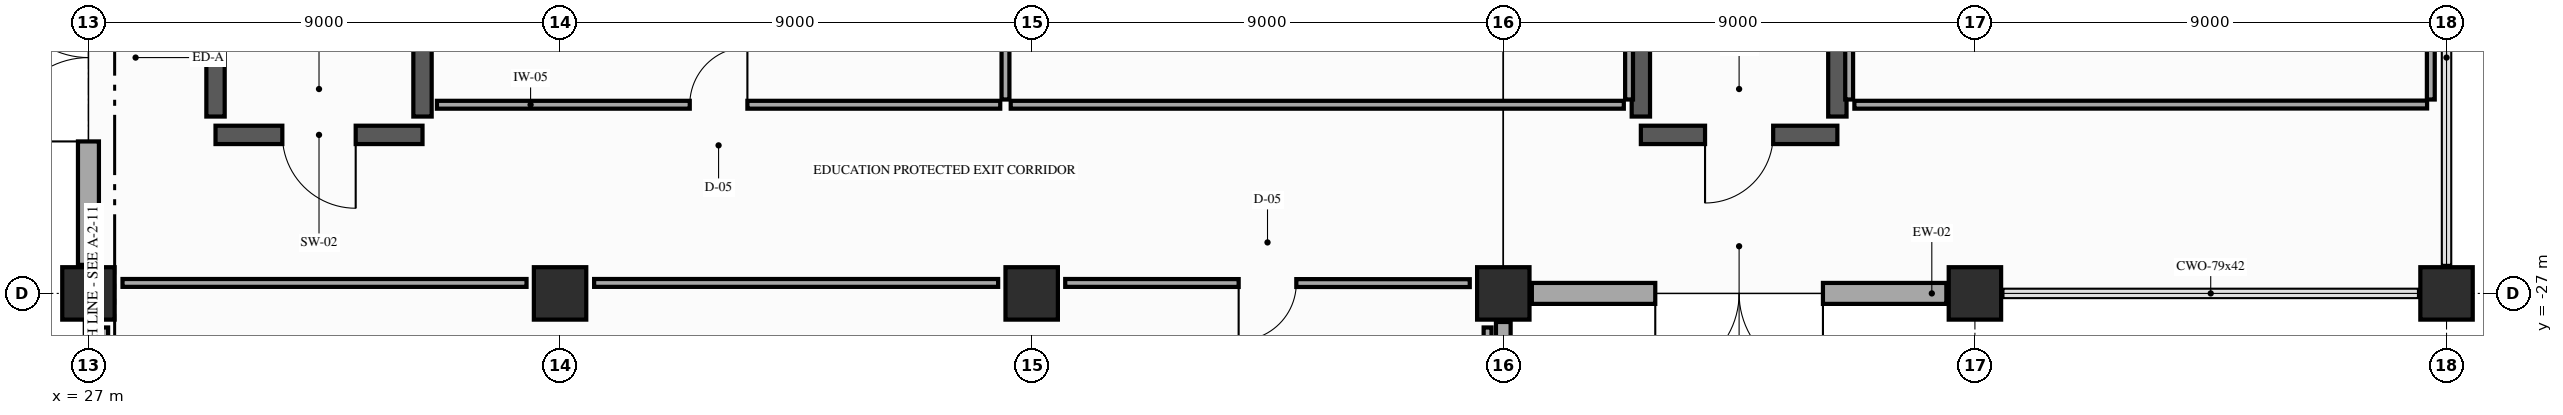
"""IFC4 building model, lengths in metres.
Left out: names, types, materials, properties, quantities, classifications, styles, units other than length and angle.
Written with IfcOpenShell. Run it as: python <this file> out.ifc"""

import sys

from ifc_helpers import new_model, si_unit, direction, frame, frame_2d, origin, origin_2d, place, context, subcontext, project, spatial, rectangle, extrude, element, fill, save


model = new_model("IFC4")
c1 = context("Model", 3, precision=1e-05, world=origin(), true_north=direction((0.0, 1.0)))
c2 = subcontext(c1, "Body", "Model", "MODEL_VIEW")
j1 = project(units=[si_unit("LENGTHUNIT", "METRE"), si_unit("PLANEANGLEUNIT", "RADIAN")], contexts=[c1])
p1 = place(None, origin())
s1 = spatial("IfcSite", under=j1, at=p1, CompositionType="ELEMENT")
p2 = place(p1, origin())
s2 = spatial("IfcBuilding", under=s1, at=p2, CompositionType="ELEMENT")
p3 = place(p2, origin())
s3 = spatial("IfcBuildingStorey", under=s2, at=p3, CompositionType="ELEMENT", Elevation=0.0)
for number, where, z_axis, x_axis in (
    (1, (27.0, -27.0, 0.0), (0.0, 0.0, 1.0), (1.0, 0.0, 0.0)),
    (2, (36.0, -27.0, 0.0), (0.0, 0.0, 1.0), (1.0, 0.0, 0.0)),
    (3, (45.0, -27.0, 0.0), (0.0, 0.0, 1.0), (1.0, 0.0, 0.0)),
    (4, (54.0, -27.0, 0.0), (0.0, 0.0, 1.0), (1.0, 0.0, 0.0)),
    (5, (63.0, -27.0, 0.0), (0.0, 0.0, 1.0), (1.0, 0.0, 0.0)),
    (6, (72.0, -27.0, 0.0), (0.0, 0.0, 1.0), (1.0, 0.0, 0.0)),
):
    element("IfcColumn", number, at=place(p3, frame(where, z_axis=z_axis, x_axis=x_axis)), inside=s3, PredefinedType="COLUMN", context=c2, shape_type="SweptSolid", body=[
        extrude(rectangle(XDim=1.0, YDim=1.0, at=origin_2d()), origin(), (0.0, 0.0, 1.0), 5.4),
    ])
p4 = place(p3, frame((62.455, -27.0, 0.0), z_axis=(0.0, 0.0, 1.0), x_axis=(-1.0, 0.0, 0.0)))
e7 = element("IfcWall", 7, at=p4, inside=s3, PredefinedType="SOLIDWALL", context=c2, shape_type="SweptSolid", body=[
    extrude(rectangle(XDim=7.91, YDim=0.4, at=frame_2d((3.955, 0.0))), origin(), (0.0, 0.0, 1.0), 4.205),
])
p5 = place(p4, frame((2.355, 0.0, 0.0)))
e8 = element("IfcOpeningElement", 8, at=p5, cuts=e7, PredefinedType="OPENING", context=c2, shape_type="SweptSolid", body=[
    extrude(rectangle(XDim=3.2, YDim=2.8, at=frame_2d((1.6, 1.4))), frame((0.0, 0.21, 0.0), z_axis=(0.0, -1.0, 0.0), x_axis=(1.0, 0.0, 0.0)), (0.0, 0.0, 1.0), 0.42),
])
p6 = place(p3, frame((54.0, -27.545, 0.0), z_axis=(0.0, 0.0, 1.0), x_axis=(0.0, -1.0, 0.0)))
e9 = element("IfcWall", 9, at=p6, inside=s3, PredefinedType="SOLIDWALL", context=c2, shape_type="SweptSolid", body=[
    extrude(rectangle(XDim=7.91, YDim=0.28, at=frame_2d((3.955, 0.0))), origin(), (0.0, 0.0, 1.0), 4.205),
])
p7 = place(p6, frame((3.205, 0.0, 0.9)))
e10 = element("IfcOpeningElement", 10, at=p7, cuts=e9, PredefinedType="OPENING", context=c2, shape_type="SweptSolid", body=[
    extrude(rectangle(XDim=1.5, YDim=2.4, at=frame_2d((0.75, 1.2))), frame((0.0, 0.15, 0.0), z_axis=(0.0, -1.0, 0.0), x_axis=(1.0, 0.0, 0.0)), (0.0, 0.0, 1.0), 0.3),
])
p8 = place(p3, frame((27.0, -26.455, 0.0), z_axis=(0.0, 0.0, 1.0), x_axis=(0.0, 1.0, 0.0)))
e11 = element("IfcWall", 11, at=p8, inside=s3, PredefinedType="SOLIDWALL", context=c2, shape_type="SweptSolid", body=[
    extrude(rectangle(XDim=7.91, YDim=0.4, at=frame_2d((3.955, 0.0))), origin(), (0.0, 0.0, 1.0), 4.205),
])
p9 = place(p8, frame((2.355, 0.0, 0.0)))
e12 = element("IfcOpeningElement", 12, at=p9, cuts=e11, PredefinedType="OPENING", context=c2, shape_type="SweptSolid", body=[
    extrude(rectangle(XDim=3.2, YDim=3.0, at=frame_2d((1.6, 1.5))), frame((0.0, 0.21, 0.0), z_axis=(0.0, -1.0, 0.0), x_axis=(1.0, 0.0, 0.0)), (0.0, 0.0, 1.0), 0.42),
])
p10 = place(p3, frame((33.375, -23.975, 0.0), z_axis=(0.0, 0.0, 1.0), x_axis=(-1.0, 0.0, 0.0)))
e13 = element("IfcWall", 13, at=p10, inside=s3, PredefinedType="SHEAR", context=c2, shape_type="SweptSolid", body=[
    extrude(rectangle(XDim=3.95, YDim=0.35, at=frame_2d((1.975, 0.0))), origin(), (0.0, 0.0, 1.0), 5.12),
])
p11 = place(p10, frame((1.275, 0.0, 0.0)))
e14 = element("IfcOpeningElement", 14, at=p11, cuts=e13, PredefinedType="OPENING", context=c2, shape_type="SweptSolid", body=[
    extrude(rectangle(XDim=1.4, YDim=2.2, at=frame_2d((0.7, 1.1))), frame((0.0, 0.185, 0.0), z_axis=(0.0, -1.0, 0.0), x_axis=(1.0, 0.0, 0.0)), (0.0, 0.0, 1.0), 0.37),
])
for number, where, z_axis, x_axis in (
    (15, (29.425, -23.625, 0.0), (0.0, 0.0, 1.0), (0.0, 1.0, 0.0)),
    (16, (33.375, -23.625, 0.0), (0.0, 0.0, 1.0), (0.0, 1.0, 0.0)),
):
    element("IfcWall", number, at=place(p3, frame(where, z_axis=z_axis, x_axis=x_axis)), inside=s3, PredefinedType="SHEAR", context=c2, shape_type="SweptSolid", body=[
        extrude(rectangle(XDim=9.1, YDim=0.35, at=frame_2d((4.55, 0.0))), origin(), (0.0, 0.0, 1.0), 5.12),
    ])
p12 = place(p3, frame((60.375, -23.975, 0.0), z_axis=(0.0, 0.0, 1.0), x_axis=(-1.0, 0.0, 0.0)))
e17 = element("IfcWall", 17, at=p12, inside=s3, PredefinedType="SHEAR", context=c2, shape_type="SweptSolid", body=[
    extrude(rectangle(XDim=3.75, YDim=0.35, at=frame_2d((1.875, 0.0))), origin(), (0.0, 0.0, 1.0), 5.12),
])
p13 = place(p12, frame((1.225, 0.0, 0.0)))
e18 = element("IfcOpeningElement", 18, at=p13, cuts=e17, PredefinedType="OPENING", context=c2, shape_type="SweptSolid", body=[
    extrude(rectangle(XDim=1.3, YDim=2.2, at=frame_2d((0.65, 1.1))), frame((0.0, 0.185, 0.0), z_axis=(0.0, -1.0, 0.0), x_axis=(1.0, 0.0, 0.0)), (0.0, 0.0, 1.0), 0.37),
])
for number, where, z_axis, x_axis in (
    (19, (56.625, -23.625, 0.0), (0.0, 0.0, 1.0), (0.0, 1.0, 0.0)),
    (20, (60.375, -23.625, 0.0), (0.0, 0.0, 1.0), (0.0, 1.0, 0.0)),
):
    element("IfcWall", number, at=place(p3, frame(where, z_axis=z_axis, x_axis=x_axis)), inside=s3, PredefinedType="SHEAR", context=c2, shape_type="SweptSolid", body=[
        extrude(rectangle(XDim=9.1, YDim=0.35, at=frame_2d((4.55, 0.0))), origin(), (0.0, 0.0, 1.0), 5.12),
    ])
p14 = place(p3, frame((33.65, -23.4, 0.0), z_axis=(0.0, 0.0, 1.0), x_axis=(1.0, 0.0, 0.0)))
e21 = element("IfcWall", 21, at=p14, inside=s3, PredefinedType="PARTITIONING", context=c2, shape_type="SweptSolid", body=[
    extrude(rectangle(XDim=10.75, YDim=0.15, at=frame_2d((5.375, 0.0))), origin(), (0.0, 0.0, 1.0), 4.255),
])
p15 = place(p14, frame((4.825, 0.0, 0.0)))
e22 = element("IfcOpeningElement", 22, at=p15, cuts=e21, PredefinedType="OPENING", context=c2, shape_type="SweptSolid", body=[
    extrude(rectangle(XDim=1.1, YDim=2.15, at=frame_2d((0.55, 1.075))), frame((0.0, 0.085, 0.0), z_axis=(0.0, -1.0, 0.0), x_axis=(1.0, 0.0, 0.0)), (0.0, 0.0, 1.0), 0.17),
])
p16 = place(p3, frame((44.5, -23.3, 0.0), z_axis=(0.0, 0.0, 1.0), x_axis=(0.0, 1.0, 0.0)))
e23 = element("IfcWall", 23, at=p16, inside=s3, PredefinedType="PARTITIONING", context=c2, shape_type="SweptSolid", body=[
    extrude(rectangle(XDim=4.66, YDim=0.15, at=frame_2d((2.33, 0.0))), origin(), (0.0, 0.0, 1.0), 4.255),
])
p17 = place(p3, frame((44.6, -23.4, 0.0), z_axis=(0.0, 0.0, 1.0), x_axis=(1.0, 0.0, 0.0)))
e24 = element("IfcWall", 24, at=p17, inside=s3, PredefinedType="PARTITIONING", context=c2, shape_type="SweptSolid", body=[
    extrude(rectangle(XDim=11.7, YDim=0.15, at=frame_2d((5.85, 0.0))), origin(), (0.0, 0.0, 1.0), 4.255),
])
p18 = place(p3, frame((56.4, -23.3, 0.0), z_axis=(0.0, 0.0, 1.0), x_axis=(0.0, 1.0, 0.0)))
e25 = element("IfcWall", 25, at=p18, inside=s3, PredefinedType="PARTITIONING", context=c2, shape_type="SweptSolid", body=[
    extrude(rectangle(XDim=13.9, YDim=0.15, at=frame_2d((6.95, 0.0))), origin(), (0.0, 0.0, 1.0), 4.205),
])
p19 = place(p18, frame((9.736, 0.0, 0.0)))
e26 = element("IfcOpeningElement", 26, at=p19, cuts=e25, PredefinedType="OPENING", context=c2, shape_type="SweptSolid", body=[
    extrude(rectangle(XDim=1.1, YDim=2.15, at=frame_2d((0.55, 1.075))), frame((0.0, 0.085, 0.0), z_axis=(0.0, -1.0, 0.0), x_axis=(1.0, 0.0, 0.0)), (0.0, 0.0, 1.0), 0.17),
])
p20 = place(p3, frame((27.3, -27.65, 0.0), z_axis=(0.0, 0.0, 1.0), x_axis=(0.0, -1.0, 0.0)))
e27 = element("IfcWall", 27, at=p20, inside=s3, PredefinedType="PARTITIONING", context=c2, shape_type="SweptSolid", body=[
    extrude(rectangle(XDim=7.7, YDim=0.15, at=frame_2d((3.85, 0.0))), origin(), (0.0, 0.0, 1.0), 4.255),
])
p21 = place(p3, frame((53.696, -35.36, 0.0), z_axis=(0.0, 0.0, 1.0), x_axis=(0.00050663367, 0.999999871661, 0.0)))
e28 = element("IfcWall", 28, at=p21, inside=s3, PredefinedType="PARTITIONING", context=c2, shape_type="SweptSolid", body=[
    extrude(rectangle(XDim=7.71, YDim=0.15, at=frame_2d((3.855, 0.0))), origin(), (0.0, 0.0, 1.0), 4.255),
])
p22 = place(p3, frame((53.36, -26.804, 0.0), z_axis=(0.0, 0.0, 1.0), x_axis=(-0.999999871994, 0.000505976787, 0.0)))
e29 = element("IfcWall", 29, at=p22, inside=s3, PredefinedType="PARTITIONING", context=c2, shape_type="SweptSolid", body=[
    extrude(rectangle(XDim=7.72, YDim=0.15, at=frame_2d((3.86, 0.0))), origin(), (0.0, 0.0, 1.0), 4.205),
])
p23 = place(p22, frame((3.31, 0.0, 0.0)))
e30 = element("IfcOpeningElement", 30, at=p23, cuts=e29, PredefinedType="OPENING", context=c2, shape_type="SweptSolid", body=[
    extrude(rectangle(XDim=1.1, YDim=2.15, at=frame_2d((0.55, 1.075))), frame((0.0, 0.085, 0.0), z_axis=(0.0, -1.0, 0.0), x_axis=(1.0, 0.0, 0.0)), (0.0, 0.0, 1.0), 0.17),
])
for number, where, z_axis, x_axis in (
    (31, (44.36, -26.8, 0.0), (0.0, 0.0, 1.0), (-1.0, 0.0, 0.0)),
    (32, (35.36, -26.8, 0.0), (0.0, 0.0, 1.0), (-1.0, 0.0, 0.0)),
):
    element("IfcWall", number, at=place(p3, frame(where, z_axis=z_axis, x_axis=x_axis)), inside=s3, PredefinedType="PARTITIONING", context=c2, shape_type="SweptSolid", body=[
        extrude(rectangle(XDim=7.71, YDim=0.15, at=frame_2d((3.855, 0.0))), origin(), (0.0, 0.0, 1.0), 4.205),
    ])
p24 = place(p3, frame((60.6, -9.39, 0.0), z_axis=(0.0, 0.0, 1.0), x_axis=(0.0, -1.0, 0.0)))
e33 = element("IfcWall", 33, at=p24, inside=s3, PredefinedType="PARTITIONING", context=c2, shape_type="SweptSolid", body=[
    extrude(rectangle(XDim=13.91, YDim=0.15, at=frame_2d((6.955, 0.0))), origin(), (0.0, 0.0, 1.0), 4.205),
])
p25 = place(p24, frame((3.067, 0.0, 0.0)))
e34 = element("IfcOpeningElement", 34, at=p25, cuts=e33, PredefinedType="OPENING", context=c2, shape_type="SweptSolid", body=[
    extrude(rectangle(XDim=1.1, YDim=2.15, at=frame_2d((0.55, 1.075))), frame((0.0, 0.085, 0.0), z_axis=(0.0, -1.0, 0.0), x_axis=(1.0, 0.0, 0.0)), (0.0, 0.0, 1.0), 0.17),
])
p26 = place(p3, frame((60.7, -23.4, 0.0), z_axis=(0.0, 0.0, 1.0), x_axis=(0.999999936125, 0.00035742207, 0.0)))
e35 = element("IfcWall", 35, at=p26, inside=s3, PredefinedType="PARTITIONING", context=c2, shape_type="SweptSolid", body=[
    extrude(rectangle(XDim=10.929, YDim=0.15, at=frame_2d((5.464, 0.0))), origin(), (0.0, 0.0, 1.0), 4.255),
])
p27 = place(p3, frame((71.7, -23.3, 0.0), z_axis=(0.0, 0.0, 1.0), x_axis=(0.0, 1.0, 0.0)))
e36 = element("IfcWall", 36, at=p27, inside=s3, PredefinedType="PARTITIONING", context=c2, shape_type="SweptSolid", body=[
    extrude(rectangle(XDim=4.65, YDim=0.15, at=frame_2d((2.325, 0.0))), origin(), (0.0, 0.0, 1.0), 4.255),
])
p28 = place(p5, origin())
e37 = element("IfcDoor", 37, at=p28, inside=s3, OperationType="DOUBLE_DOOR_SINGLE_SWING", PredefinedType="DOOR", context=c2, shape_type="SweptSolid", body=[
    extrude(rectangle(XDim=3.2, YDim=2.8, at=frame_2d((1.6, 1.4))), frame((0.0, 0.025, 0.0), z_axis=(0.0, -1.0, 0.0), x_axis=(1.0, 0.0, 0.0)), (0.0, 0.0, 1.0), 0.05),
])
fill(e8, e37)
p29 = place(p9, origin())
e38 = element("IfcDoor", 38, at=p29, inside=s3, OperationType="DOUBLE_DOOR_SINGLE_SWING", PredefinedType="DOOR", context=c2, shape_type="SweptSolid", body=[
    extrude(rectangle(XDim=3.2, YDim=3.0, at=frame_2d((1.6, 1.5))), frame((0.0, 0.025, 0.0), z_axis=(0.0, -1.0, 0.0), x_axis=(1.0, 0.0, 0.0)), (0.0, 0.0, 1.0), 0.05),
])
fill(e12, e38)
p30 = place(p11, origin())
e39 = element("IfcDoor", 39, at=p30, inside=s3, OperationType="SINGLE_SWING_LEFT", PredefinedType="DOOR", context=c2, shape_type="SweptSolid", body=[
    extrude(rectangle(XDim=1.4, YDim=2.2, at=frame_2d((0.7, 1.1))), frame((0.0, 0.025, 0.0), z_axis=(0.0, -1.0, 0.0), x_axis=(1.0, 0.0, 0.0)), (0.0, 0.0, 1.0), 0.05),
])
fill(e14, e39)
p31 = place(p13, origin())
e40 = element("IfcDoor", 40, at=p31, inside=s3, OperationType="SINGLE_SWING_RIGHT", PredefinedType="DOOR", context=c2, shape_type="SweptSolid", body=[
    extrude(rectangle(XDim=1.3, YDim=2.2, at=frame_2d((0.65, 1.1))), frame((0.0, 0.025, 0.0), z_axis=(0.0, -1.0, 0.0), x_axis=(1.0, 0.0, 0.0)), (0.0, 0.0, 1.0), 0.05),
])
fill(e18, e40)
p32 = place(p15, origin())
e41 = element("IfcDoor", 41, at=p32, inside=s3, OperationType="SINGLE_SWING_RIGHT", PredefinedType="DOOR", context=c2, shape_type="SweptSolid", body=[
    extrude(rectangle(XDim=1.1, YDim=2.15, at=frame_2d((0.55, 1.075))), frame((0.0, 0.025, 0.0), z_axis=(0.0, -1.0, 0.0), x_axis=(1.0, 0.0, 0.0)), (0.0, 0.0, 1.0), 0.05),
])
fill(e22, e41)
p33 = place(p23, origin())
e42 = element("IfcDoor", 42, at=p33, inside=s3, OperationType="SINGLE_SWING_RIGHT", PredefinedType="DOOR", context=c2, shape_type="SweptSolid", body=[
    extrude(rectangle(XDim=1.1, YDim=2.15, at=frame_2d((0.55, 1.075))), frame((0.0, 0.025, 0.0), z_axis=(0.0, -1.0, 0.0), x_axis=(1.0, 0.0, 0.0)), (0.0, 0.0, 1.0), 0.05),
])
fill(e30, e42)
save(model, sys.argv[1])
